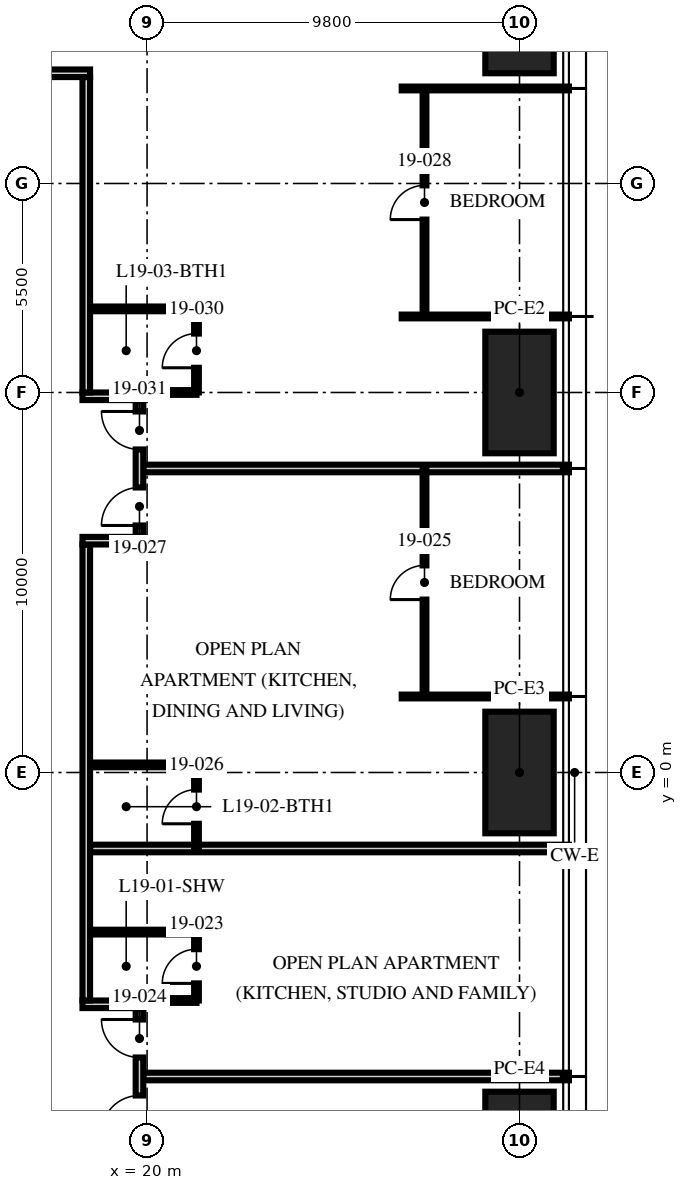
"""IFC4 building model, lengths in metres.
Left out: names, types, materials, properties, quantities, classifications, styles, units other than length and angle.
Written with IfcOpenShell. Run it as: python <this file> out.ifc"""

import sys

from ifc_helpers import new_model, si_unit, direction, frame, frame_2d, origin, origin_2d, place, context, subcontext, project, spatial, rectangle, hollow_rectangle, extrude, element, fill, save


model = new_model("IFC4")
c1 = context("Model", 3, precision=1e-05, world=origin(), true_north=direction((0.0, 1.0)))
c2 = subcontext(c1, "Body", "Model", "MODEL_VIEW")
j1 = project(units=[si_unit("LENGTHUNIT", "METRE"), si_unit("PLANEANGLEUNIT", "RADIAN")], contexts=[c1])
p1 = place(None, origin())
s1 = spatial("IfcSite", under=j1, at=p1, CompositionType="ELEMENT")
p2 = place(p1, origin())
s2 = spatial("IfcBuilding", under=s1, at=p2, CompositionType="ELEMENT")
p3 = place(p2, frame((0.0, 0.0, 77.25)))
s3 = spatial("IfcBuildingStorey", under=s2, at=p3, CompositionType="ELEMENT", Elevation=77.25)
for number, where, z_axis, x_axis in (
    (1, (29.8, 20.0, 0.0), (0.0, 0.0, 1.0), (0.0, 1.0, 0.0)),
    (2, (29.8, 10.0, 0.0), (0.0, 0.0, 1.0), (0.0, 1.0, 0.0)),
    (3, (29.8, 0.0, 0.0), (0.0, 0.0, 1.0), (0.0, 1.0, 0.0)),
    (4, (29.8, -10.0, 0.0), (0.0, 0.0, 1.0), (0.0, 1.0, 0.0)),
):
    element("IfcColumn", number, at=place(p3, frame(where, z_axis=z_axis, x_axis=x_axis)), inside=s3, PredefinedType="COLUMN", context=c2, shape_type="SweptSolid", body=[
        extrude(hollow_rectangle(XDim=3.2, YDim=1.8, WallThickness=0.2, at=origin_2d()), origin(), (0.0, 0.0, 1.0), 3.75),
    ])
p4 = place(p3, frame((19.9, -8.0, 0.0), z_axis=(0.0, 0.0, 1.0), x_axis=(1.0, 0.0, 0.0)))
e5 = element("IfcWall", 5, at=p4, inside=s3, PredefinedType="PARTITIONING", context=c2, shape_type="SweptSolid", body=[
    extrude(rectangle(XDim=11.2, YDim=0.2, at=frame_2d((5.6, 0.0))), origin(), (0.0, 0.0, 1.0), 2.71),
])
p5 = place(p3, frame((18.5, -2.0, 0.0), z_axis=(0.0, 0.0, 1.0), x_axis=(1.0, 0.0, 0.0)))
e6 = element("IfcWall", 6, at=p5, inside=s3, PredefinedType="PARTITIONING", context=c2, shape_type="SweptSolid", body=[
    extrude(rectangle(XDim=12.6, YDim=0.2, at=frame_2d((6.3, 0.0))), origin(), (0.0, 0.0, 1.0), 2.71),
])
p6 = place(p3, frame((26.7, 2.0, 0.0), z_axis=(0.0, 0.0, 1.0), x_axis=(1.0, 0.0, 0.0)))
e7 = element("IfcWall", 7, at=p6, inside=s3, PredefinedType="PARTITIONING", context=c2, shape_type="SweptSolid", body=[
    extrude(rectangle(XDim=4.4, YDim=0.1, at=frame_2d((2.2, 0.0))), origin(), (0.0, 0.0, 1.0), 2.71),
])
p7 = place(p3, frame((19.9, 8.0, 0.0), z_axis=(0.0, 0.0, 1.0), x_axis=(1.0, 0.0, 0.0)))
e8 = element("IfcWall", 8, at=p7, inside=s3, PredefinedType="PARTITIONING", context=c2, shape_type="SweptSolid", body=[
    extrude(rectangle(XDim=11.2, YDim=0.2, at=frame_2d((5.6, 0.0))), origin(), (0.0, 0.0, 1.0), 2.71),
])
for number, where, z_axis, x_axis in (
    (9, (26.7, 12.0, 0.0), (0.0, 0.0, 1.0), (1.0, 0.0, 0.0)),
    (10, (26.7, 18.0, 0.0), (0.0, 0.0, 1.0), (1.0, 0.0, 0.0)),
):
    element("IfcWall", number, at=place(p3, frame(where, z_axis=z_axis, x_axis=x_axis)), inside=s3, PredefinedType="PARTITIONING", context=c2, shape_type="SweptSolid", body=[
        extrude(rectangle(XDim=4.4, YDim=0.1, at=frame_2d((2.2, 0.0))), origin(), (0.0, 0.0, 1.0), 2.71),
    ])
p8 = place(p3, frame((21.3, -6.0, 0.0), z_axis=(0.0, 0.0, 1.0), x_axis=(0.0, 1.0, 0.0)))
e11 = element("IfcWall", 11, at=p8, inside=s3, PredefinedType="PARTITIONING", context=c2, shape_type="SweptSolid", body=[
    extrude(rectangle(XDim=1.8, YDim=0.125, at=frame_2d((0.9, 0.0))), origin(), (0.0, 0.0, 1.0), 2.61),
])
p9 = place(p8, frame((0.45, 0.0, 0.0)))
e12 = element("IfcOpeningElement", 12, at=p9, cuts=e11, PredefinedType="OPENING", context=c2, shape_type="SweptSolid", body=[
    extrude(rectangle(XDim=0.9, YDim=2.1, at=frame_2d((0.45, 1.05))), frame((0.0, 0.073, 0.0), z_axis=(0.0, -1.0, 0.0), x_axis=(1.0, 0.0, 0.0)), (0.0, 0.0, 1.0), 0.145),
])
p10 = place(p3, frame((19.97, -6.0, 0.0), z_axis=(0.0, 0.0, 1.0), x_axis=(1.0, 0.0, 0.0)))
e13 = element("IfcWall", 13, at=p10, inside=s3, PredefinedType="PARTITIONING", context=c2, shape_type="SweptSolid", body=[
    extrude(rectangle(XDim=1.33, YDim=0.125, at=frame_2d((0.665, 0.0))), origin(), (0.0, 0.0, 1.0), 3.5),
])
p11 = place(p3, frame((18.5, -4.2, 0.0), z_axis=(0.0, 0.0, 1.0), x_axis=(1.0, 0.0, 0.0)))
e14 = element("IfcWall", 14, at=p11, inside=s3, PredefinedType="PARTITIONING", context=c2, shape_type="SweptSolid", body=[
    extrude(rectangle(XDim=2.8, YDim=0.125, at=frame_2d((1.4, 0.0))), origin(), (0.0, 0.0, 1.0), 3.5),
])
p12 = place(p3, frame((27.3, 2.0, 0.0), z_axis=(0.0, 0.0, 1.0), x_axis=(0.0, 1.0, 0.0)))
e15 = element("IfcWall", 15, at=p12, inside=s3, PredefinedType="PARTITIONING", context=c2, shape_type="SweptSolid", body=[
    extrude(rectangle(XDim=6.0, YDim=0.1, at=frame_2d((3.0, 0.0))), origin(), (0.0, 0.0, 1.0), 2.61),
])
p13 = place(p12, frame((2.55, 0.0, 0.0)))
e16 = element("IfcOpeningElement", 16, at=p13, cuts=e15, PredefinedType="OPENING", context=c2, shape_type="SweptSolid", body=[
    extrude(rectangle(XDim=0.9, YDim=2.1, at=frame_2d((0.45, 1.05))), frame((0.0, 0.06, 0.0), z_axis=(0.0, -1.0, 0.0), x_axis=(1.0, 0.0, 0.0)), (0.0, 0.0, 1.0), 0.12),
])
p14 = place(p3, frame((21.3, -2.0, 0.0), z_axis=(0.0, 0.0, 1.0), x_axis=(0.0, 1.0, 0.0)))
e17 = element("IfcWall", 17, at=p14, inside=s3, PredefinedType="PARTITIONING", context=c2, shape_type="SweptSolid", body=[
    extrude(rectangle(XDim=2.2, YDim=0.125, at=frame_2d((1.1, 0.0))), origin(), (0.0, 0.0, 1.0), 2.492),
])
p15 = place(p14, frame((0.65, 0.0, 0.0)))
e18 = element("IfcOpeningElement", 18, at=p15, cuts=e17, PredefinedType="OPENING", context=c2, shape_type="SweptSolid", body=[
    extrude(rectangle(XDim=0.9, YDim=2.1, at=frame_2d((0.45, 1.05))), frame((0.0, 0.073, 0.0), z_axis=(0.0, -1.0, 0.0), x_axis=(1.0, 0.0, 0.0)), (0.0, 0.0, 1.0), 0.145),
])
p16 = place(p3, frame((18.5, 0.2, 0.0), z_axis=(0.0, 0.0, 1.0), x_axis=(1.0, 0.0, 0.0)))
e19 = element("IfcWall", 19, at=p16, inside=s3, PredefinedType="PARTITIONING", context=c2, shape_type="SweptSolid", body=[
    extrude(rectangle(XDim=2.8, YDim=0.125, at=frame_2d((1.4, 0.0))), origin(), (0.0, 0.0, 1.0), 2.492),
])
p17 = place(p3, frame((27.3, 12.0, 0.0), z_axis=(0.0, 0.0, 1.0), x_axis=(0.0, 1.0, 0.0)))
e20 = element("IfcWall", 20, at=p17, inside=s3, PredefinedType="PARTITIONING", context=c2, shape_type="SweptSolid", body=[
    extrude(rectangle(XDim=6.0, YDim=0.1, at=frame_2d((3.0, 0.0))), origin(), (0.0, 0.0, 1.0), 2.61),
])
p18 = place(p17, frame((2.55, 0.0, 0.0)))
e21 = element("IfcOpeningElement", 21, at=p18, cuts=e20, PredefinedType="OPENING", context=c2, shape_type="SweptSolid", body=[
    extrude(rectangle(XDim=0.9, YDim=2.1, at=frame_2d((0.45, 1.05))), frame((0.0, 0.06, 0.0), z_axis=(0.0, -1.0, 0.0), x_axis=(1.0, 0.0, 0.0)), (0.0, 0.0, 1.0), 0.12),
])
p19 = place(p3, frame((21.3, 10.0, 0.0), z_axis=(0.0, 0.0, 1.0), x_axis=(0.0, 1.0, 0.0)))
e22 = element("IfcWall", 22, at=p19, inside=s3, PredefinedType="PARTITIONING", context=c2, shape_type="SweptSolid", body=[
    extrude(rectangle(XDim=2.2, YDim=0.125, at=frame_2d((1.1, 0.0))), origin(), (0.0, 0.0, 1.0), 2.492),
])
p20 = place(p19, frame((0.65, 0.0, 0.0)))
e23 = element("IfcOpeningElement", 23, at=p20, cuts=e22, PredefinedType="OPENING", context=c2, shape_type="SweptSolid", body=[
    extrude(rectangle(XDim=0.9, YDim=2.1, at=frame_2d((0.45, 1.05))), frame((0.0, 0.073, 0.0), z_axis=(0.0, -1.0, 0.0), x_axis=(1.0, 0.0, 0.0)), (0.0, 0.0, 1.0), 0.145),
])
p21 = place(p3, frame((19.97, 10.0, 0.0), z_axis=(0.0, 0.0, 1.0), x_axis=(1.0, 0.0, 0.0)))
e24 = element("IfcWall", 24, at=p21, inside=s3, PredefinedType="PARTITIONING", context=c2, shape_type="SweptSolid", body=[
    extrude(rectangle(XDim=1.33, YDim=0.125, at=frame_2d((0.665, 0.0))), origin(), (0.0, 0.0, 1.0), 2.492),
])
p22 = place(p3, frame((18.5, 12.2, 0.0), z_axis=(0.0, 0.0, 1.0), x_axis=(1.0, 0.0, 0.0)))
e25 = element("IfcWall", 25, at=p22, inside=s3, PredefinedType="PARTITIONING", context=c2, shape_type="SweptSolid", body=[
    extrude(rectangle(XDim=2.8, YDim=0.125, at=frame_2d((1.4, 0.0))), origin(), (0.0, 0.0, 1.0), 3.5),
])
p23 = place(p3, frame((18.3, -6.1, 0.0), z_axis=(0.0, 0.0, 1.0), x_axis=(1.0, 0.0, 0.0)))
e26 = element("IfcWall", 26, at=p23, inside=s3, PredefinedType="PARTITIONING", context=c2, shape_type="SweptSolid", body=[
    extrude(rectangle(XDim=1.6, YDim=0.2, at=frame_2d((0.8, 0.0))), origin(), (0.0, 0.0, 1.0), 3.5),
])
p24 = place(p3, frame((19.8, -9.8, 0.0), z_axis=(0.0, 0.0, 1.0), x_axis=(0.0, 1.0, 0.0)))
e27 = element("IfcWall", 27, at=p24, inside=s3, PredefinedType="PARTITIONING", context=c2, shape_type="SweptSolid", body=[
    extrude(rectangle(XDim=3.6, YDim=0.2, at=frame_2d((1.8, 0.0))), origin(), (0.0, 0.0, 1.0), 3.5),
])
p25 = place(p24, frame((2.3, 0.0, 0.0)))
e28 = element("IfcOpeningElement", 28, at=p25, cuts=e27, PredefinedType="OPENING", context=c2, shape_type="SweptSolid", body=[
    extrude(rectangle(XDim=1.0, YDim=2.2, at=frame_2d((0.5, 1.1))), frame((0.0, 0.11, 0.0), z_axis=(0.0, -1.0, 0.0), x_axis=(1.0, 0.0, 0.0)), (0.0, 0.0, 1.0), 0.22),
])
p26 = place(p24, frame((0.3, 0.0, 0.0)))
e29 = element("IfcOpeningElement", 29, at=p26, cuts=e27, PredefinedType="OPENING", context=c2, shape_type="SweptSolid", body=[
    extrude(rectangle(XDim=1.0, YDim=2.2, at=frame_2d((0.5, 1.1))), frame((0.0, 0.11, 0.0), z_axis=(0.0, -1.0, 0.0), x_axis=(1.0, 0.0, 0.0)), (0.0, 0.0, 1.0), 0.22),
])
p27 = place(p3, frame((18.4, -6.0, 0.0), z_axis=(0.0, 0.0, 1.0), x_axis=(0.0, 1.0, 0.0)))
e30 = element("IfcWall", 30, at=p27, inside=s3, PredefinedType="PARTITIONING", context=c2, shape_type="SweptSolid", body=[
    extrude(rectangle(XDim=12.0, YDim=0.2, at=frame_2d((6.0, 0.0))), origin(), (0.0, 0.0, 1.0), 2.492),
])
p28 = place(p3, frame((18.3, 6.1, 0.0), z_axis=(0.0, 0.0, 1.0), x_axis=(1.0, 0.0, 0.0)))
e31 = element("IfcWall", 31, at=p28, inside=s3, PredefinedType="PARTITIONING", context=c2, shape_type="SweptSolid", body=[
    extrude(rectangle(XDim=1.6, YDim=0.2, at=frame_2d((0.8, 0.0))), origin(), (0.0, 0.0, 1.0), 3.5),
])
p29 = place(p3, frame((18.3, 9.9, 0.0), z_axis=(0.0, 0.0, 1.0), x_axis=(1.0, 0.0, 0.0)))
e32 = element("IfcWall", 32, at=p29, inside=s3, PredefinedType="PARTITIONING", context=c2, shape_type="SweptSolid", body=[
    extrude(rectangle(XDim=1.6, YDim=0.2, at=frame_2d((0.8, 0.0))), origin(), (0.0, 0.0, 1.0), 2.492),
])
p30 = place(p3, frame((19.8, 6.2, 0.0), z_axis=(0.0, 0.0, 1.0), x_axis=(0.0, 1.0, 0.0)))
e33 = element("IfcWall", 33, at=p30, inside=s3, PredefinedType="PARTITIONING", context=c2, shape_type="SweptSolid", body=[
    extrude(rectangle(XDim=3.6, YDim=0.2, at=frame_2d((1.8, 0.0))), origin(), (0.0, 0.0, 1.0), 3.5),
])
p31 = place(p30, frame((0.3, 0.0, 0.0)))
e34 = element("IfcOpeningElement", 34, at=p31, cuts=e33, PredefinedType="OPENING", context=c2, shape_type="SweptSolid", body=[
    extrude(rectangle(XDim=1.0, YDim=2.2, at=frame_2d((0.5, 1.1))), frame((0.0, 0.11, 0.0), z_axis=(0.0, -1.0, 0.0), x_axis=(1.0, 0.0, 0.0)), (0.0, 0.0, 1.0), 0.22),
])
p32 = place(p30, frame((2.3, 0.0, 0.0)))
e35 = element("IfcOpeningElement", 35, at=p32, cuts=e33, PredefinedType="OPENING", context=c2, shape_type="SweptSolid", body=[
    extrude(rectangle(XDim=1.0, YDim=2.2, at=frame_2d((0.5, 1.1))), frame((0.0, 0.11, 0.0), z_axis=(0.0, -1.0, 0.0), x_axis=(1.0, 0.0, 0.0)), (0.0, 0.0, 1.0), 0.22),
])
p33 = place(p3, frame((18.4, 10.0, 0.0), z_axis=(0.0, 0.0, 1.0), x_axis=(0.0, 1.0, 0.0)))
e36 = element("IfcWall", 36, at=p33, inside=s3, PredefinedType="PARTITIONING", context=c2, shape_type="SweptSolid", body=[
    extrude(rectangle(XDim=8.3, YDim=0.2, at=frame_2d((4.15, 0.0))), origin(), (0.0, 0.0, 1.0), 2.3),
])
p34 = place(p3, frame((-18.5, 18.4, 0.0), z_axis=(0.0, 0.0, 1.0), x_axis=(1.0, 0.0, 0.0)))
e37 = element("IfcWall", 37, at=p34, inside=s3, PredefinedType="PARTITIONING", context=c2, shape_type="SweptSolid", body=[
    extrude(rectangle(XDim=37.0, YDim=0.2, at=frame_2d((18.5, 0.0))), origin(), (0.0, 0.0, 1.0), 2.3),
])
p35 = place(p34, frame((20.93, 0.0, 0.0)))
e38 = element("IfcOpeningElement", 38, at=p35, cuts=e37, PredefinedType="OPENING", context=c2, shape_type="SweptSolid", body=[
    extrude(rectangle(XDim=1.0, YDim=2.2, at=frame_2d((0.5, 1.1))), frame((0.0, 0.11, 0.0), z_axis=(0.0, -1.0, 0.0), x_axis=(1.0, 0.0, 0.0)), (0.0, 0.0, 1.0), 0.22),
])
p36 = place(p34, frame((0.98, 0.0, 0.0)))
e39 = element("IfcOpeningElement", 39, at=p36, cuts=e37, PredefinedType="OPENING", context=c2, shape_type="SweptSolid", body=[
    extrude(rectangle(XDim=1.0, YDim=2.2, at=frame_2d((0.5, 1.1))), frame((0.0, 0.11, 0.0), z_axis=(0.0, -1.0, 0.0), x_axis=(1.0, 0.0, 0.0)), (0.0, 0.0, 1.0), 0.22),
])
p37 = place(p9, origin())
e40 = element("IfcDoor", 40, at=p37, inside=s3, OperationType="SINGLE_SWING_LEFT", PredefinedType="DOOR", context=c2, shape_type="SweptSolid", body=[
    extrude(rectangle(XDim=0.9, YDim=2.1, at=frame_2d((0.45, 1.05))), frame((0.0, 0.025, 0.0), z_axis=(0.0, -1.0, 0.0), x_axis=(1.0, 0.0, 0.0)), (0.0, 0.0, 1.0), 0.05),
])
fill(e12, e40)
p38 = place(p25, origin())
e41 = element("IfcDoor", 41, at=p38, inside=s3, OperationType="SINGLE_SWING_RIGHT", PredefinedType="DOOR", context=c2, shape_type="SweptSolid", body=[
    extrude(rectangle(XDim=1.0, YDim=2.2, at=frame_2d((0.5, 1.1))), frame((0.0, 0.025, 0.0), z_axis=(0.0, -1.0, 0.0), x_axis=(1.0, 0.0, 0.0)), (0.0, 0.0, 1.0), 0.05),
])
fill(e28, e41)
p39 = place(p13, origin())
e42 = element("IfcDoor", 42, at=p39, inside=s3, OperationType="SINGLE_SWING_LEFT", PredefinedType="DOOR", context=c2, shape_type="SweptSolid", body=[
    extrude(rectangle(XDim=0.9, YDim=2.1, at=frame_2d((0.45, 1.05))), frame((0.0, 0.025, 0.0), z_axis=(0.0, -1.0, 0.0), x_axis=(1.0, 0.0, 0.0)), (0.0, 0.0, 1.0), 0.05),
])
fill(e16, e42)
p40 = place(p15, origin())
e43 = element("IfcDoor", 43, at=p40, inside=s3, OperationType="SINGLE_SWING_LEFT", PredefinedType="DOOR", context=c2, shape_type="SweptSolid", body=[
    extrude(rectangle(XDim=0.9, YDim=2.1, at=frame_2d((0.45, 1.05))), frame((0.0, 0.025, 0.0), z_axis=(0.0, -1.0, 0.0), x_axis=(1.0, 0.0, 0.0)), (0.0, 0.0, 1.0), 0.05),
])
fill(e18, e43)
p41 = place(p31, origin())
e44 = element("IfcDoor", 44, at=p41, inside=s3, OperationType="SINGLE_SWING_LEFT", PredefinedType="DOOR", context=c2, shape_type="SweptSolid", body=[
    extrude(rectangle(XDim=1.0, YDim=2.2, at=frame_2d((0.5, 1.1))), frame((0.0, 0.025, 0.0), z_axis=(0.0, -1.0, 0.0), x_axis=(1.0, 0.0, 0.0)), (0.0, 0.0, 1.0), 0.05),
])
fill(e34, e44)
p42 = place(p18, origin())
e45 = element("IfcDoor", 45, at=p42, inside=s3, OperationType="SINGLE_SWING_LEFT", PredefinedType="DOOR", context=c2, shape_type="SweptSolid", body=[
    extrude(rectangle(XDim=0.9, YDim=2.1, at=frame_2d((0.45, 1.05))), frame((0.0, 0.025, 0.0), z_axis=(0.0, -1.0, 0.0), x_axis=(1.0, 0.0, 0.0)), (0.0, 0.0, 1.0), 0.05),
])
fill(e21, e45)
p43 = place(p20, origin())
e46 = element("IfcDoor", 46, at=p43, inside=s3, OperationType="SINGLE_SWING_LEFT", PredefinedType="DOOR", context=c2, shape_type="SweptSolid", body=[
    extrude(rectangle(XDim=0.9, YDim=2.1, at=frame_2d((0.45, 1.05))), frame((0.0, 0.025, 0.0), z_axis=(0.0, -1.0, 0.0), x_axis=(1.0, 0.0, 0.0)), (0.0, 0.0, 1.0), 0.05),
])
fill(e23, e46)
p44 = place(p32, origin())
e47 = element("IfcDoor", 47, at=p44, inside=s3, OperationType="SINGLE_SWING_RIGHT", PredefinedType="DOOR", context=c2, shape_type="SweptSolid", body=[
    extrude(rectangle(XDim=1.0, YDim=2.2, at=frame_2d((0.5, 1.1))), frame((0.0, 0.025, 0.0), z_axis=(0.0, -1.0, 0.0), x_axis=(1.0, 0.0, 0.0)), (0.0, 0.0, 1.0), 0.05),
])
fill(e35, e47)
p45 = place(p26, origin())
e48 = element("IfcDoor", 48, at=p45, inside=s3, OperationType="SINGLE_SWING_LEFT", PredefinedType="DOOR", context=c2, shape_type="SweptSolid", body=[
    extrude(rectangle(XDim=1.0, YDim=2.2, at=frame_2d((0.5, 1.1))), frame((0.0, 0.025, 0.0), z_axis=(0.0, -1.0, 0.0), x_axis=(1.0, 0.0, 0.0)), (0.0, 0.0, 1.0), 0.05),
])
fill(e29, e48)
save(model, sys.argv[1])
